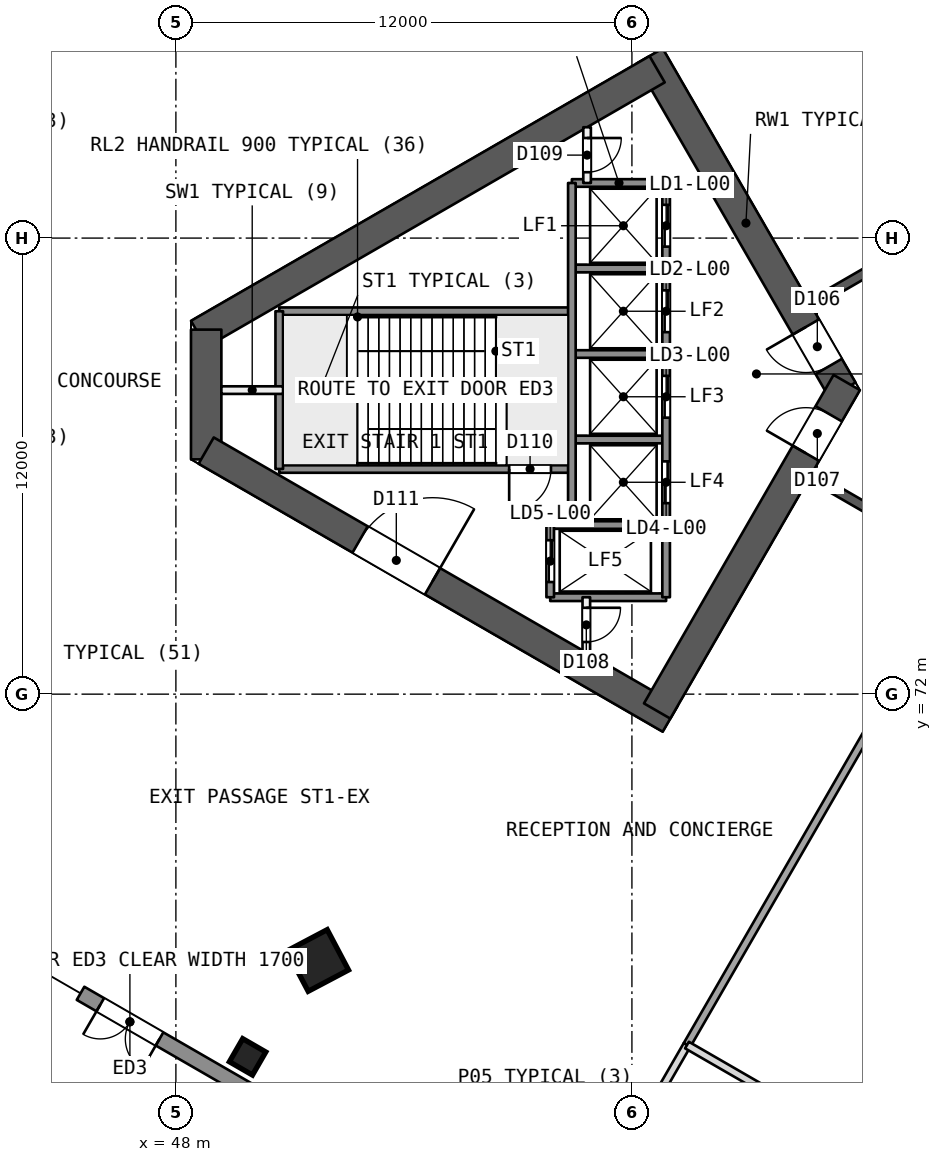
"""IFC4 building model, lengths in metres.
Left out: names, types, materials, properties, quantities, classifications, styles, units other than length and angle.
Written with IfcOpenShell. Run it as: python <this file> out.ifc"""

import sys

from ifc_helpers import new_model, si_unit, direction, frame, frame_2d, origin, origin_2d, place, context, subcontext, project, spatial, rectangle, extrude, element, fill, save


model = new_model("IFC4")
c1 = context("Model", 3, precision=1e-05, world=origin(), true_north=direction((0.0, 1.0)))
c2 = subcontext(c1, "Body", "Model", "MODEL_VIEW")
j1 = project(units=[si_unit("LENGTHUNIT", "METRE"), si_unit("PLANEANGLEUNIT", "RADIAN")], contexts=[c1])
p1 = place(None, origin())
s1 = spatial("IfcSite", under=j1, at=p1, CompositionType="ELEMENT")
p2 = place(p1, origin())
s2 = spatial("IfcBuilding", under=s1, at=p2, CompositionType="ELEMENT")
p3 = place(p2, origin())
s3 = spatial("IfcBuildingStorey", under=s2, at=p3, CompositionType="ELEMENT", Elevation=0.0)
p4 = place(p3, frame((65.538, 80.0, 0.0), z_axis=(0.0, 0.0, 1.0), x_axis=(-0.49999662545, 0.866027352073, 0.0)))
e1 = element("IfcWall", 1, at=p4, inside=s3, PredefinedType="SHEAR", context=c2, shape_type="SweptSolid", body=[
    extrude(rectangle(XDim=10.149, YDim=0.8, at=frame_2d((5.074, 0.0))), origin(), (0.0, 0.0, 1.0), 9.0),
])
p5 = place(p4, frame((0.719, 0.0, 0.0)))
e2 = element("IfcOpeningElement", 2, at=p5, cuts=e1, PredefinedType="OPENING", context=c2, shape_type="SweptSolid", body=[
    extrude(rectangle(XDim=1.2, YDim=2.1, at=frame_2d((0.6, 1.05))), frame((0.0, 0.411, 0.0), z_axis=(0.0, -1.0, 0.0), x_axis=(1.0, 0.0, 0.0)), (0.0, 0.0, 1.0), 0.821),
])
p6 = place(p3, frame((60.664, 88.443, 0.0), z_axis=(0.0, 0.0, 1.0), x_axis=(-0.866029478545, -0.499992942241, 0.0)))
e3 = element("IfcWall", 3, at=p6, inside=s3, PredefinedType="SHEAR", context=c2, shape_type="SweptSolid", body=[
    extrude(rectangle(XDim=13.933, YDim=0.8, at=frame_2d((6.967, 0.0))), origin(), (0.0, 0.0, 1.0), 9.0),
])
p7 = place(p3, frame((48.797, 81.592, 0.0), z_axis=(0.0, 0.0, 1.0), x_axis=(0.0, -1.0, 0.0)))
e4 = element("IfcWall", 4, at=p7, inside=s3, PredefinedType="SHEAR", context=c2, shape_type="SweptSolid", body=[
    extrude(rectangle(XDim=3.415, YDim=0.8, at=frame_2d((1.707, 0.0))), origin(), (0.0, 0.0, 1.0), 9.0),
])
p8 = place(p3, frame((48.797, 78.408, 0.0), z_axis=(0.0, 0.0, 1.0), x_axis=(0.866032504327, -0.499987701298, 0.0)))
e5 = element("IfcWall", 5, at=p8, inside=s3, PredefinedType="SHEAR", context=c2, shape_type="SweptSolid", body=[
    extrude(rectangle(XDim=14.102, YDim=0.8, at=frame_2d((7.051, 0.0))), origin(), (0.0, 0.0, 1.0), 9.0),
])
p9 = place(p8, frame((4.677, 0.0, 0.0)))
e6 = element("IfcOpeningElement", 6, at=p9, cuts=e5, PredefinedType="OPENING", context=c2, shape_type="SweptSolid", body=[
    extrude(rectangle(XDim=2.2, YDim=2.1, at=frame_2d((1.1, 1.05))), frame((0.0, 0.411, 0.0), z_axis=(0.0, -1.0, 0.0), x_axis=(1.0, 0.0, 0.0)), (0.0, 0.0, 1.0), 0.821),
])
p10 = place(p3, frame((60.664, 71.557, 0.0), z_axis=(0.0, 0.0, 1.0), x_axis=(0.50000409368, 0.866023040284, 0.0)))
e7 = element("IfcWall", 7, at=p10, inside=s3, PredefinedType="SHEAR", context=c2, shape_type="SweptSolid", body=[
    extrude(rectangle(XDim=9.98, YDim=0.8, at=frame_2d((4.99, 0.0))), origin(), (0.0, 0.0, 1.0), 9.0),
])
p11 = place(p10, frame((7.83, 0.0, 0.0)))
e8 = element("IfcOpeningElement", 8, at=p11, cuts=e7, PredefinedType="OPENING", context=c2, shape_type="SweptSolid", body=[
    extrude(rectangle(XDim=1.2, YDim=2.1, at=frame_2d((0.6, 1.05))), frame((0.0, 0.411, 0.0), z_axis=(0.0, -1.0, 0.0), x_axis=(1.0, 0.0, 0.0)), (0.0, 0.0, 1.0), 0.821),
])
p12 = place(p3, frame((78.2, 90.046, 0.0), z_axis=(0.0, 0.0, 1.0), x_axis=(-0.866026492143, -0.499998114903, 0.0)))
e9 = element("IfcWall", 9, at=p12, inside=s3, PredefinedType="SHEAR", context=c2, shape_type="SweptSolid", body=[
    extrude(rectangle(XDim=15.588, YDim=0.25, at=frame_2d((7.794, 0.0))), origin(), (0.0, 0.0, 1.0), 8.6),
])
p13 = place(p12, frame((7.194, 0.0, 0.0)))
e10 = element("IfcOpeningElement", 10, at=p13, cuts=e9, PredefinedType="OPENING", context=c2, shape_type="SweptSolid", body=[
    extrude(rectangle(XDim=1.2, YDim=2.4, at=frame_2d((0.6, 1.2))), frame((0.0, 0.135, 0.0), z_axis=(0.0, -1.0, 0.0), x_axis=(1.0, 0.0, 0.0)), (0.0, 0.0, 1.0), 0.271),
])
p14 = place(p3, frame((64.7, 77.748, 0.0), z_axis=(0.0, 0.0, 1.0), x_axis=(0.866026492143, -0.499998114903, 0.0)))
e11 = element("IfcWall", 11, at=p14, inside=s3, PredefinedType="SHEAR", context=c2, shape_type="SweptSolid", body=[
    extrude(rectangle(XDim=15.588, YDim=0.25, at=frame_2d((7.794, 0.0))), origin(), (0.0, 0.0, 1.0), 8.6),
])
p15 = place(p14, frame((1.738, 0.0, 0.0)))
e12 = element("IfcOpeningElement", 12, at=p15, cuts=e11, PredefinedType="OPENING", context=c2, shape_type="SweptSolid", body=[
    extrude(rectangle(XDim=1.2, YDim=2.4, at=frame_2d((0.6, 1.2))), frame((0.0, 0.135, 0.0), z_axis=(0.0, -1.0, 0.0), x_axis=(1.0, 0.0, 0.0)), (0.0, 0.0, 1.0), 0.271),
])
p16 = place(p14, frame((4.928, 0.0, 0.0)))
e13 = element("IfcOpeningElement", 13, at=p16, cuts=e11, PredefinedType="OPENING", context=c2, shape_type="SweptSolid", body=[
    extrude(rectangle(XDim=0.9, YDim=2.1, at=frame_2d((0.45, 1.05))), frame((0.0, 0.135, 0.0), z_axis=(0.0, -1.0, 0.0), x_axis=(1.0, 0.0, 0.0)), (0.0, 0.0, 1.0), 0.271),
])
p17 = place(p14, frame((6.331, 0.0, 0.0)))
e14 = element("IfcOpeningElement", 14, at=p17, cuts=e11, PredefinedType="OPENING", context=c2, shape_type="SweptSolid", body=[
    extrude(rectangle(XDim=0.9, YDim=2.1, at=frame_2d((0.45, 1.05))), frame((0.0, 0.135, 0.0), z_axis=(0.0, -1.0, 0.0), x_axis=(1.0, 0.0, 0.0)), (0.0, 0.0, 1.0), 0.271),
])
p18 = place(p14, frame((7.968, 0.0, 0.0)))
e15 = element("IfcOpeningElement", 15, at=p18, cuts=e11, PredefinedType="OPENING", context=c2, shape_type="SweptSolid", body=[
    extrude(rectangle(XDim=0.9, YDim=2.1, at=frame_2d((0.45, 1.05))), frame((0.0, 0.135, 0.0), z_axis=(0.0, -1.0, 0.0), x_axis=(1.0, 0.0, 0.0)), (0.0, 0.0, 1.0), 0.271),
])
p19 = place(p14, frame((11.871, 0.0, 0.0)))
e16 = element("IfcOpeningElement", 16, at=p19, cuts=e11, PredefinedType="OPENING", context=c2, shape_type="SweptSolid", body=[
    extrude(rectangle(XDim=1.2, YDim=2.4, at=frame_2d((0.6, 1.2))), frame((0.0, 0.135, 0.0), z_axis=(0.0, -1.0, 0.0), x_axis=(1.0, 0.0, 0.0)), (0.0, 0.0, 1.0), 0.271),
])
p20 = place(p3, frame((51.708, 64.978, 0.0), z_axis=(0.019336318869, 0.01214960849, 0.999739212888), x_axis=(-0.865812285451, 0.500255247016, 0.010666498721)))
e17 = element("IfcColumn", 17, at=p20, inside=s3, PredefinedType="COLUMN", context=c2, shape_type="SweptSolid", body=[
    extrude(rectangle(XDim=1.2, YDim=1.2, at=origin_2d()), origin(), (0.0, 0.0, 1.0), 9.002),
])
p21 = place(p3, frame((49.887, 62.456, -0.4), z_axis=(0.0, 0.0, 1.0), x_axis=(0.5, 0.866025403784, 0.0)))
e18 = element("IfcColumn", 18, at=p21, inside=s3, PredefinedType="COLUMN", context=c2, shape_type="SweptSolid", body=[
    extrude(rectangle(XDim=0.7, YDim=0.7, at=origin_2d()), origin(), (0.0, 0.0, 1.0), 9.4),
])
p22 = place(p3, frame((61.449, 62.767, 0.0), z_axis=(0.0, 0.0, 1.0), x_axis=(0.499999493275, 0.866025696342, 0.0)))
e19 = element("IfcWall", 19, at=p22, inside=s3, PredefinedType="PARTITIONING", context=c2, shape_type="SweptSolid", body=[
    extrude(rectangle(XDim=10.4, YDim=0.2, at=frame_2d((5.2, 0.0))), origin(), (0.0, 0.0, 1.0), 8.6),
])
p23 = place(p3, frame((58.078, 56.928, 0.0), z_axis=(0.0, 0.0, 1.0), x_axis=(0.500002470373, 0.866023977509, 0.0)))
e20 = element("IfcWall", 20, at=p23, inside=s3, PredefinedType="PARTITIONING", context=c2, shape_type="SweptSolid", body=[
    extrude(rectangle(XDim=6.742, YDim=0.2, at=frame_2d((3.371, 0.0))), origin(), (0.0, 0.0, 1.0), 8.6),
])
p24 = place(p23, frame((2.941, 0.0, 0.0)))
e21 = element("IfcOpeningElement", 21, at=p24, cuts=e20, PredefinedType="OPENING", context=c2, shape_type="SweptSolid", body=[
    extrude(rectangle(XDim=1.0, YDim=2.1, at=frame_2d((0.5, 1.05))), frame((0.0, 0.11, 0.0), z_axis=(0.0, -1.0, 0.0), x_axis=(1.0, 0.0, 0.0)), (0.0, 0.0, 1.0), 0.221),
])
p25 = place(p3, frame((61.449, 62.767, 0.0), z_axis=(0.0, 0.0, 1.0), x_axis=(0.866023506795, -0.500003285667, 0.0)))
e22 = element("IfcWall", 22, at=p25, inside=s3, PredefinedType="PARTITIONING", context=c2, shape_type="SweptSolid", body=[
    extrude(rectangle(XDim=7.4, YDim=0.2, at=frame_2d((3.7, 0.0))), origin(), (0.0, 0.0, 1.0), 8.6),
])
p26 = place(p3, frame((54.3, 59.042, 0.0), z_axis=(0.0, 0.0, 1.0), x_axis=(-0.866020516738, 0.500008464518, 0.0)))
e23 = element("IfcWall", 23, at=p26, inside=s3, PredefinedType="SOLIDWALL", context=c2, shape_type="SweptSolid", body=[
    extrude(rectangle(XDim=10.172, YDim=0.4, at=frame_2d((5.086, 0.0))), origin(), (0.0, 0.0, 1.0), 8.6),
])
p27 = place(p26, frame((7.772, 0.0, 0.0)))
e24 = element("IfcOpeningElement", 24, at=p27, cuts=e23, PredefinedType="OPENING", context=c2, shape_type="SweptSolid", body=[
    extrude(rectangle(XDim=1.8, YDim=2.4, at=frame_2d((0.9, 1.2))), frame((0.0, 0.21, 0.0), z_axis=(0.0, -1.0, 0.0), x_axis=(1.0, 0.0, 0.0)), (0.0, 0.0, 1.0), 0.421),
])
p28 = place(p26, frame((0.6, 0.0, 0.0)))
e25 = element("IfcOpeningElement", 25, at=p28, cuts=e23, PredefinedType="OPENING", context=c2, shape_type="SweptSolid", body=[
    extrude(rectangle(XDim=1.4, YDim=2.4, at=frame_2d((0.7, 1.2))), frame((0.0, 0.21, 0.0), z_axis=(0.0, -1.0, 0.0), x_axis=(1.0, 0.0, 0.0)), (0.0, 0.0, 1.0), 0.421),
])
for number, where, z_axis, x_axis in (
    (26, (60.9, 85.45, 0.0), (0.0, 0.0, 1.0), (-1.0, 0.0, 0.0)),
    (27, (60.9, 83.2, 0.0), (0.0, 0.0, 1.0), (-1.0, 0.0, 0.0)),
):
    element("IfcWall", number, at=place(p3, frame(where, z_axis=z_axis, x_axis=x_axis)), inside=s3, PredefinedType="SOLIDWALL", context=c2, shape_type="SweptSolid", body=[
        extrude(rectangle(XDim=2.48, YDim=0.2, at=frame_2d((1.24, 0.0))), origin(), (0.0, 0.0, 1.0), 8.6),
    ])
p29 = place(p3, frame((58.42, 82.075, 0.0), z_axis=(0.0, 0.0, 1.0), x_axis=(-1.0, 0.0, 0.0)))
e28 = element("IfcWall", 28, at=p29, inside=s3, PredefinedType="SOLIDWALL", context=c2, shape_type="SweptSolid", body=[
    extrude(rectangle(XDim=7.7, YDim=0.2, at=frame_2d((3.85, 0.0))), origin(), (0.0, 0.0, 1.0), 8.6),
])
p30 = place(p3, frame((60.9, 80.95, 0.0), z_axis=(0.0, 0.0, 1.0), x_axis=(-1.0, 0.0, 0.0)))
e29 = element("IfcWall", 29, at=p30, inside=s3, PredefinedType="SOLIDWALL", context=c2, shape_type="SweptSolid", body=[
    extrude(rectangle(XDim=2.48, YDim=0.2, at=frame_2d((1.24, 0.0))), origin(), (0.0, 0.0, 1.0), 8.6),
])
p31 = place(p3, frame((50.82, 80.0, 0.0), z_axis=(0.0, 0.0, 1.0), x_axis=(-1.0, 0.0, 0.0)))
e30 = element("IfcWall", 30, at=p31, inside=s3, PredefinedType="PARTITIONING", context=c2, shape_type="SweptSolid", body=[
    extrude(rectangle(XDim=1.623, YDim=0.2, at=frame_2d((0.812, 0.0))), origin(), (0.0, 0.0, 1.0), 8.6),
])
p32 = place(p3, frame((60.9, 78.7, 0.0), z_axis=(0.0, 0.0, 1.0), x_axis=(-1.0, 0.0, 0.0)))
e31 = element("IfcWall", 31, at=p32, inside=s3, PredefinedType="SOLIDWALL", context=c2, shape_type="SweptSolid", body=[
    extrude(rectangle(XDim=2.48, YDim=0.2, at=frame_2d((1.24, 0.0))), origin(), (0.0, 0.0, 1.0), 8.6),
])
p33 = place(p3, frame((58.42, 77.925, 0.0), z_axis=(0.0, 0.0, 1.0), x_axis=(-1.0, 0.0, 0.0)))
e32 = element("IfcWall", 32, at=p33, inside=s3, PredefinedType="SOLIDWALL", context=c2, shape_type="SweptSolid", body=[
    extrude(rectangle(XDim=7.7, YDim=0.2, at=frame_2d((3.85, 0.0))), origin(), (0.0, 0.0, 1.0), 8.6),
])
p34 = place(p33, frame((0.55, 0.0, 0.0)))
e33 = element("IfcOpeningElement", 33, at=p34, cuts=e32, PredefinedType="OPENING", context=c2, shape_type="SweptSolid", body=[
    extrude(rectangle(XDim=1.1, YDim=2.1, at=frame_2d((0.55, 1.05))), frame((0.0, 0.11, 0.0), z_axis=(0.0, -1.0, 0.0), x_axis=(1.0, 0.0, 0.0)), (0.0, 0.0, 1.0), 0.221),
])
for number, where, z_axis, x_axis in (
    (34, (60.9, 76.45, 0.0), (0.0, 0.0, 1.0), (-1.0, 0.0, 0.0)),
    (35, (60.9, 74.55, 0.0), (0.0, 0.0, 1.0), (-1.0, 0.0, 0.0)),
):
    element("IfcWall", number, at=place(p3, frame(where, z_axis=z_axis, x_axis=x_axis)), inside=s3, PredefinedType="SOLIDWALL", context=c2, shape_type="SweptSolid", body=[
        extrude(rectangle(XDim=3.05, YDim=0.2, at=frame_2d((1.525, 0.0))), origin(), (0.0, 0.0, 1.0), 8.6),
    ])
p35 = place(p3, frame((60.9, 85.45, 0.0), z_axis=(0.0, 0.0, 1.0), x_axis=(0.0, -1.0, 0.0)))
e36 = element("IfcWall", 36, at=p35, inside=s3, PredefinedType="SOLIDWALL", context=c2, shape_type="SweptSolid", body=[
    extrude(rectangle(XDim=10.9, YDim=0.2, at=frame_2d((5.45, 0.0))), origin(), (0.0, 0.0, 1.0), 8.6),
])
p36 = place(p35, frame((0.575, 0.0, 0.0)))
e37 = element("IfcOpeningElement", 37, at=p36, cuts=e36, PredefinedType="OPENING", context=c2, shape_type="SweptSolid", body=[
    extrude(rectangle(XDim=1.1, YDim=2.1, at=frame_2d((0.55, 1.05))), frame((0.0, 0.11, 0.0), z_axis=(0.0, -1.0, 0.0), x_axis=(1.0, 0.0, 0.0)), (0.0, 0.0, 1.0), 0.221),
])
p37 = place(p35, frame((2.825, 0.0, 0.0)))
e38 = element("IfcOpeningElement", 38, at=p37, cuts=e36, PredefinedType="OPENING", context=c2, shape_type="SweptSolid", body=[
    extrude(rectangle(XDim=1.1, YDim=2.1, at=frame_2d((0.55, 1.05))), frame((0.0, 0.11, 0.0), z_axis=(0.0, -1.0, 0.0), x_axis=(1.0, 0.0, 0.0)), (0.0, 0.0, 1.0), 0.221),
])
p38 = place(p35, frame((5.075, 0.0, 0.0)))
e39 = element("IfcOpeningElement", 39, at=p38, cuts=e36, PredefinedType="OPENING", context=c2, shape_type="SweptSolid", body=[
    extrude(rectangle(XDim=1.1, YDim=2.1, at=frame_2d((0.55, 1.05))), frame((0.0, 0.11, 0.0), z_axis=(0.0, -1.0, 0.0), x_axis=(1.0, 0.0, 0.0)), (0.0, 0.0, 1.0), 0.221),
])
p39 = place(p35, frame((7.325, 0.0, 0.0)))
e40 = element("IfcOpeningElement", 40, at=p39, cuts=e36, PredefinedType="OPENING", context=c2, shape_type="SweptSolid", body=[
    extrude(rectangle(XDim=1.1, YDim=2.1, at=frame_2d((0.55, 1.05))), frame((0.0, 0.11, 0.0), z_axis=(0.0, -1.0, 0.0), x_axis=(1.0, 0.0, 0.0)), (0.0, 0.0, 1.0), 0.221),
])
p40 = place(p3, frame((58.82, 86.917, 0.0), z_axis=(0.0, 0.0, 1.0), x_axis=(0.0, -1.0, 0.0)))
e41 = element("IfcWall", 41, at=p40, inside=s3, PredefinedType="PARTITIONING", context=c2, shape_type="SweptSolid", body=[
    extrude(rectangle(XDim=1.467, YDim=0.2, at=frame_2d((0.733, 0.0))), origin(), (0.0, 0.0, 1.0), 8.6),
])
p41 = place(p40, frame((0.283, 0.0, 0.0)))
e42 = element("IfcOpeningElement", 42, at=p41, cuts=e41, PredefinedType="OPENING", context=c2, shape_type="SweptSolid", body=[
    extrude(rectangle(XDim=0.9, YDim=2.1, at=frame_2d((0.45, 1.05))), frame((0.0, 0.11, 0.0), z_axis=(0.0, -1.0, 0.0), x_axis=(1.0, 0.0, 0.0)), (0.0, 0.0, 1.0), 0.221),
])
p42 = place(p3, frame((58.8, 74.55, 0.0), z_axis=(0.0, 0.0, 1.0), x_axis=(0.0, -1.0, 0.0)))
e43 = element("IfcWall", 43, at=p42, inside=s3, PredefinedType="PARTITIONING", context=c2, shape_type="SweptSolid", body=[
    extrude(rectangle(XDim=1.455, YDim=0.2, at=frame_2d((0.728, 0.0))), origin(), (0.0, 0.0, 1.0), 8.6),
])
p43 = place(p42, frame((0.278, 0.0, 0.0)))
e44 = element("IfcOpeningElement", 44, at=p43, cuts=e43, PredefinedType="OPENING", context=c2, shape_type="SweptSolid", body=[
    extrude(rectangle(XDim=0.9, YDim=2.1, at=frame_2d((0.45, 1.05))), frame((0.0, 0.11, 0.0), z_axis=(0.0, -1.0, 0.0), x_axis=(1.0, 0.0, 0.0)), (0.0, 0.0, 1.0), 0.221),
])
p44 = place(p3, frame((58.42, 85.45, 0.0), z_axis=(0.0, 0.0, 1.0), x_axis=(0.0, -1.0, 0.0)))
e45 = element("IfcWall", 45, at=p44, inside=s3, PredefinedType="SOLIDWALL", context=c2, shape_type="SweptSolid", body=[
    extrude(rectangle(XDim=9.0, YDim=0.2, at=frame_2d((4.5, 0.0))), origin(), (0.0, 0.0, 1.0), 8.6),
])
p45 = place(p3, frame((57.85, 76.45, 0.0), z_axis=(0.0, 0.0, 1.0), x_axis=(0.0, -1.0, 0.0)))
e46 = element("IfcWall", 46, at=p45, inside=s3, PredefinedType="SOLIDWALL", context=c2, shape_type="SweptSolid", body=[
    extrude(rectangle(XDim=1.9, YDim=0.2, at=frame_2d((0.95, 0.0))), origin(), (0.0, 0.0, 1.0), 8.6),
])
p46 = place(p45, frame((0.4, 0.0, 0.0)))
e47 = element("IfcOpeningElement", 47, at=p46, cuts=e46, PredefinedType="OPENING", context=c2, shape_type="SweptSolid", body=[
    extrude(rectangle(XDim=1.1, YDim=2.1, at=frame_2d((0.55, 1.05))), frame((0.0, 0.11, 0.0), z_axis=(0.0, -1.0, 0.0), x_axis=(1.0, 0.0, 0.0)), (0.0, 0.0, 1.0), 0.221),
])
p47 = place(p3, frame((50.72, 82.075, 0.0), z_axis=(0.0, 0.0, 1.0), x_axis=(0.0, -1.0, 0.0)))
e48 = element("IfcWall", 48, at=p47, inside=s3, PredefinedType="SOLIDWALL", context=c2, shape_type="SweptSolid", body=[
    extrude(rectangle(XDim=4.15, YDim=0.2, at=frame_2d((2.075, 0.0))), origin(), (0.0, 0.0, 1.0), 8.6),
])
p48 = place(p27, origin())
e49 = element("IfcDoor", 49, at=p48, inside=s3, OperationType="DOUBLE_DOOR_SINGLE_SWING", PredefinedType="NOTDEFINED", context=c2, shape_type="SweptSolid", body=[
    extrude(rectangle(XDim=1.8, YDim=2.4, at=frame_2d((0.9, 1.2))), frame((0.0, 0.025, 0.0), z_axis=(0.0, -1.0, 0.0), x_axis=(1.0, 0.0, 0.0)), (0.0, 0.0, 1.0), 0.05),
])
fill(e24, e49)
p49 = place(p5, origin())
e50 = element("IfcDoor", 50, at=p49, inside=s3, OperationType="SINGLE_SWING_RIGHT", PredefinedType="NOTDEFINED", context=c2, shape_type="SweptSolid", body=[
    extrude(rectangle(XDim=1.2, YDim=2.1, at=frame_2d((0.6, 1.05))), frame((0.0, 0.025, 0.0), z_axis=(0.0, -1.0, 0.0), x_axis=(1.0, 0.0, 0.0)), (0.0, 0.0, 1.0), 0.05),
])
fill(e2, e50)
p50 = place(p11, origin())
e51 = element("IfcDoor", 51, at=p50, inside=s3, OperationType="SINGLE_SWING_LEFT", PredefinedType="NOTDEFINED", context=c2, shape_type="SweptSolid", body=[
    extrude(rectangle(XDim=1.2, YDim=2.1, at=frame_2d((0.6, 1.05))), frame((0.0, 0.025, 0.0), z_axis=(0.0, -1.0, 0.0), x_axis=(1.0, 0.0, 0.0)), (0.0, 0.0, 1.0), 0.05),
])
fill(e8, e51)
p51 = place(p36, origin())
e52 = element("IfcDoor", 52, at=p51, inside=s3, OperationType="SLIDING_TO_RIGHT", PredefinedType="NOTDEFINED", context=c2, shape_type="SweptSolid", body=[
    extrude(rectangle(XDim=1.1, YDim=2.1, at=frame_2d((0.55, 1.05))), frame((0.0, 0.025, 0.0), z_axis=(0.0, -1.0, 0.0), x_axis=(1.0, 0.0, 0.0)), (0.0, 0.0, 1.0), 0.05),
])
fill(e37, e52)
p52 = place(p37, origin())
e53 = element("IfcDoor", 53, at=p52, inside=s3, OperationType="SLIDING_TO_LEFT", PredefinedType="NOTDEFINED", context=c2, shape_type="SweptSolid", body=[
    extrude(rectangle(XDim=1.1, YDim=2.1, at=frame_2d((0.55, 1.05))), frame((0.0, 0.025, 0.0), z_axis=(0.0, -1.0, 0.0), x_axis=(1.0, 0.0, 0.0)), (0.0, 0.0, 1.0), 0.05),
])
fill(e38, e53)
p53 = place(p38, origin())
e54 = element("IfcDoor", 54, at=p53, inside=s3, OperationType="SLIDING_TO_RIGHT", PredefinedType="NOTDEFINED", context=c2, shape_type="SweptSolid", body=[
    extrude(rectangle(XDim=1.1, YDim=2.1, at=frame_2d((0.55, 1.05))), frame((0.0, 0.025, 0.0), z_axis=(0.0, -1.0, 0.0), x_axis=(1.0, 0.0, 0.0)), (0.0, 0.0, 1.0), 0.05),
])
fill(e39, e54)
p54 = place(p39, origin())
e55 = element("IfcDoor", 55, at=p54, inside=s3, OperationType="SLIDING_TO_LEFT", PredefinedType="NOTDEFINED", context=c2, shape_type="SweptSolid", body=[
    extrude(rectangle(XDim=1.1, YDim=2.1, at=frame_2d((0.55, 1.05))), frame((0.0, 0.025, 0.0), z_axis=(0.0, -1.0, 0.0), x_axis=(1.0, 0.0, 0.0)), (0.0, 0.0, 1.0), 0.05),
])
fill(e40, e55)
p55 = place(p46, origin())
e56 = element("IfcDoor", 56, at=p55, inside=s3, OperationType="SLIDING_TO_RIGHT", PredefinedType="NOTDEFINED", context=c2, shape_type="SweptSolid", body=[
    extrude(rectangle(XDim=1.1, YDim=2.1, at=frame_2d((0.55, 1.05))), frame((0.0, 0.025, 0.0), z_axis=(0.0, -1.0, 0.0), x_axis=(1.0, 0.0, 0.0)), (0.0, 0.0, 1.0), 0.05),
])
fill(e47, e56)
p56 = place(p43, origin())
e57 = element("IfcDoor", 57, at=p56, inside=s3, OperationType="SINGLE_SWING_LEFT", PredefinedType="NOTDEFINED", context=c2, shape_type="SweptSolid", body=[
    extrude(rectangle(XDim=0.9, YDim=2.1, at=frame_2d((0.45, 1.05))), frame((0.0, 0.025, 0.0), z_axis=(0.0, -1.0, 0.0), x_axis=(1.0, 0.0, 0.0)), (0.0, 0.0, 1.0), 0.05),
])
fill(e44, e57)
p57 = place(p41, origin())
e58 = element("IfcDoor", 58, at=p57, inside=s3, OperationType="SINGLE_SWING_LEFT", PredefinedType="NOTDEFINED", context=c2, shape_type="SweptSolid", body=[
    extrude(rectangle(XDim=0.9, YDim=2.1, at=frame_2d((0.45, 1.05))), frame((0.0, 0.025, 0.0), z_axis=(0.0, -1.0, 0.0), x_axis=(1.0, 0.0, 0.0)), (0.0, 0.0, 1.0), 0.05),
])
fill(e42, e58)
p58 = place(p34, origin())
e59 = element("IfcDoor", 59, at=p58, inside=s3, OperationType="SINGLE_SWING_RIGHT", PredefinedType="NOTDEFINED", context=c2, shape_type="SweptSolid", body=[
    extrude(rectangle(XDim=1.1, YDim=2.1, at=frame_2d((0.55, 1.05))), frame((0.0, 0.025, 0.0), z_axis=(0.0, -1.0, 0.0), x_axis=(1.0, 0.0, 0.0)), (0.0, 0.0, 1.0), 0.05),
])
fill(e33, e59)
p59 = place(p9, origin())
e60 = element("IfcDoor", 60, at=p59, inside=s3, OperationType="SINGLE_SWING_RIGHT", PredefinedType="NOTDEFINED", context=c2, shape_type="SweptSolid", body=[
    extrude(rectangle(XDim=2.2, YDim=2.1, at=frame_2d((1.1, 1.05))), frame((0.0, 0.025, 0.0), z_axis=(0.0, -1.0, 0.0), x_axis=(1.0, 0.0, 0.0)), (0.0, 0.0, 1.0), 0.05),
])
fill(e6, e60)
save(model, sys.argv[1])
